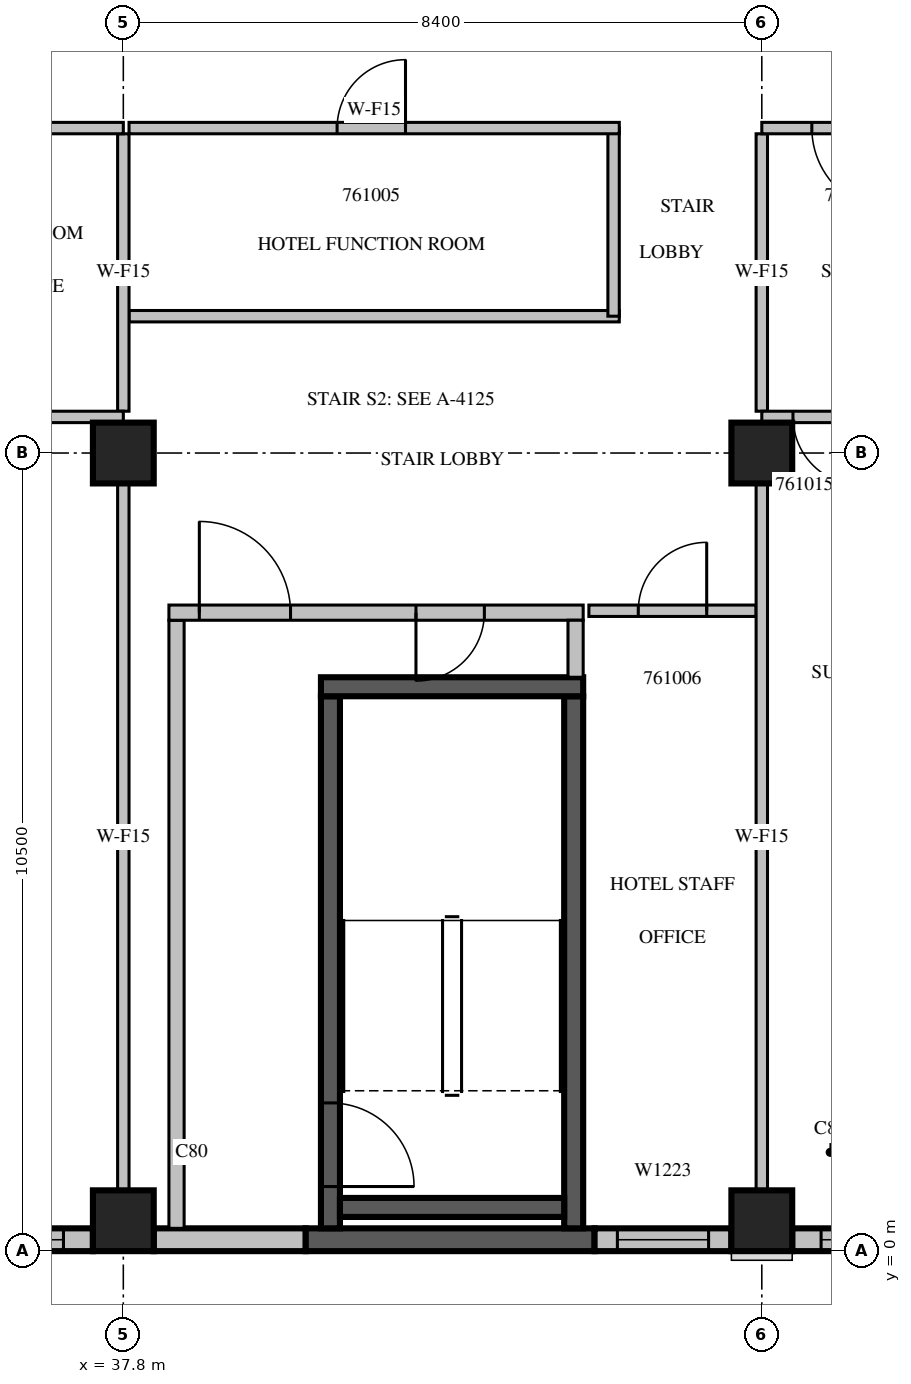
"""IFC4 building model, lengths in metres.
Left out: names, types, materials, properties, quantities, classifications, styles, units other than length and angle.
Written with IfcOpenShell. Run it as: python <this file> out.ifc"""

import sys

from ifc_helpers import new_model, si_unit, direction, frame, frame_2d, origin, origin_2d, place, context, subcontext, project, spatial, rectangle, extrude, source, transform, mapped, element, fill, save


model = new_model("IFC4")
c1 = context("Model", 3, precision=1e-05, world=origin(), true_north=direction((0.0, 1.0)))
c2 = subcontext(c1, "Body", "Model", "MODEL_VIEW")
j1 = project(units=[si_unit("LENGTHUNIT", "METRE"), si_unit("PLANEANGLEUNIT", "RADIAN")], contexts=[c1])
p1 = place(None, origin())
s1 = spatial("IfcSite", under=j1, at=p1, CompositionType="ELEMENT")
p2 = place(p1, origin())
s2 = spatial("IfcBuilding", under=s1, at=p2, CompositionType="ELEMENT")
p3 = place(p2, frame((0.0, 0.0, 265.2)))
s3 = spatial("IfcBuildingStorey", under=s2, at=p3, CompositionType="ELEMENT", Elevation=265.2)
m1 = source(origin(), c2, "Body", "SweptSolid", [
    extrude(rectangle(XDim=0.8, YDim=0.8, at=origin_2d()), origin(), (0.0, 0.0, 1.0), 3.8),
])
for number, where, z_axis, x_axis in (
    (1, (37.8, 0.4, 0.0), (0.0, 0.0, 1.0), (1.0, 0.0, 0.0)),
    (2, (46.2, 0.4, 0.0), (0.0, 0.0, 1.0), (1.0, 0.0, 0.0)),
    (3, (37.8, 10.5, 0.0), (0.0, 0.0, 1.0), (1.0, 0.0, 0.0)),
    (4, (46.2, 10.5, 0.0), (0.0, 0.0, 1.0), (1.0, 0.0, 0.0)),
):
    element("IfcColumn", number, at=place(p3, frame(where, z_axis=z_axis, x_axis=x_axis)), inside=s3, PredefinedType="COLUMN", context=c2, shape_type="MappedRepresentation", body=[
        mapped(m1, transform((0.0, 0.0, 0.0), scale=1.0)),
    ])
m2 = source(origin(), c2, "Body", "SweptSolid", [
    extrude(rectangle(XDim=7.6, YDim=0.3, at=frame_2d((3.8, 0.0))), origin(), (0.0, 0.0, 1.0), 3.4),
])
p4 = place(p3, frame((29.8, 0.15, 0.0), z_axis=(0.0, 0.0, 1.0), x_axis=(1.0, 0.0, 0.0)))
e5 = element("IfcWall", 5, at=p4, inside=s3, PredefinedType="STANDARD", context=c2, shape_type="MappedRepresentation", body=[
    mapped(m2, transform((0.0, 0.0, 0.0), scale=1.0)),
])
m3 = source(origin(), c2, "Body", "SweptSolid", [
    extrude(rectangle(XDim=1.2, YDim=2.3, at=frame_2d((0.6, 1.15))), frame((0.0, 0.16, 0.0), z_axis=(0.0, -1.0, 0.0), x_axis=(1.0, 0.0, 0.0)), (0.0, 0.0, 1.0), 0.32),
])
p5 = place(p4, frame((0.487, 0.0, 0.6)))
e6 = element("IfcOpeningElement", 6, at=p5, cuts=e5, PredefinedType="OPENING", context=c2, shape_type="MappedRepresentation", body=[
    mapped(m3, transform((0.0, 0.0, 0.0), scale=1.0)),
])
p6 = place(p4, frame((6.013, 0.0, 0.6)))
e7 = element("IfcOpeningElement", 7, at=p6, cuts=e5, PredefinedType="OPENING", context=c2, shape_type="MappedRepresentation", body=[
    mapped(m3, transform((0.0, 0.0, 0.0), scale=1.0)),
])
m4 = source(origin(), c2, "Body", "SweptSolid", [
    extrude(rectangle(XDim=2.0, YDim=0.3, at=frame_2d((1.0, 0.0))), origin(), (0.0, 0.0, 1.0), 3.4),
])
p7 = place(p3, frame((38.2, 0.15, 0.0), z_axis=(0.0, 0.0, 1.0), x_axis=(1.0, 0.0, 0.0)))
e8 = element("IfcWall", 8, at=p7, inside=s3, PredefinedType="STANDARD", context=c2, shape_type="MappedRepresentation", body=[
    mapped(m4, transform((0.0, 0.0, 0.0), scale=1.0)),
])
m5 = source(origin(), c2, "Body", "SweptSolid", [
    extrude(rectangle(XDim=3.8, YDim=0.3, at=frame_2d((1.9, 0.0))), origin(), (0.0, 0.0, 1.0), 3.4),
])
p8 = place(p3, frame((40.2, 0.15, 0.0), z_axis=(0.0, 0.0, 1.0), x_axis=(1.0, 0.0, 0.0)))
e9 = element("IfcWall", 9, at=p8, inside=s3, PredefinedType="SOLIDWALL", context=c2, shape_type="MappedRepresentation", body=[
    mapped(m5, transform((0.0, 0.0, 0.0), scale=1.0)),
])
m6 = source(origin(), c2, "Body", "SweptSolid", [
    extrude(rectangle(XDim=1.8, YDim=0.3, at=frame_2d((0.9, 0.0))), origin(), (0.0, 0.0, 1.0), 3.4),
])
p9 = place(p3, frame((44.0, 0.15, 0.0), z_axis=(0.0, 0.0, 1.0), x_axis=(1.0, 0.0, 0.0)))
e10 = element("IfcWall", 10, at=p9, inside=s3, PredefinedType="STANDARD", context=c2, shape_type="MappedRepresentation", body=[
    mapped(m6, transform((0.0, 0.0, 0.0), scale=1.0)),
])
p10 = place(p9, frame((0.3, 0.0, 0.6)))
e11 = element("IfcOpeningElement", 11, at=p10, cuts=e10, PredefinedType="OPENING", context=c2, shape_type="MappedRepresentation", body=[
    mapped(m3, transform((0.0, 0.0, 0.0), scale=1.0)),
])
m7 = source(origin(), c2, "Body", "SweptSolid", [
    extrude(rectangle(XDim=2.96, YDim=0.3, at=frame_2d((1.48, 0.0))), origin(), (0.0, 0.0, 1.0), 3.4),
])
p11 = place(p3, frame((46.6, 0.15, 0.0), z_axis=(0.0, 0.0, 1.0), x_axis=(1.0, 0.0, 0.0)))
e12 = element("IfcWall", 12, at=p11, inside=s3, PredefinedType="STANDARD", context=c2, shape_type="MappedRepresentation", body=[
    mapped(m7, transform((0.0, 0.0, 0.0), scale=1.0)),
])
m8 = source(origin(), c2, "Body", "SweptSolid", [
    extrude(rectangle(XDim=1.8, YDim=2.3, at=frame_2d((0.9, 1.15))), frame((0.0, 0.16, 0.0), z_axis=(0.0, -1.0, 0.0), x_axis=(1.0, 0.0, 0.0)), (0.0, 0.0, 1.0), 0.32),
])
p12 = place(p11, frame((0.38, 0.0, 0.6)))
e13 = element("IfcOpeningElement", 13, at=p12, cuts=e12, PredefinedType="OPENING", context=c2, shape_type="MappedRepresentation", body=[
    mapped(m8, transform((0.0, 0.0, 0.0), scale=1.0)),
])
m9 = source(origin(), c2, "Body", "SweptSolid", [
    extrude(rectangle(XDim=7.0, YDim=0.25, at=frame_2d((3.5, 0.0))), origin(), (0.0, 0.0, 1.0), 3.4),
])
p13 = place(p3, frame((40.525, 0.3, 0.0), z_axis=(0.0, 0.0, 1.0), x_axis=(0.0, 1.0, 0.0)))
e14 = element("IfcWall", 14, at=p13, inside=s3, PredefinedType="SOLIDWALL", context=c2, shape_type="MappedRepresentation", body=[
    mapped(m9, transform((0.0, 0.0, 0.0), scale=1.0)),
])
m10 = source(origin(), c2, "Body", "SweptSolid", [
    extrude(rectangle(XDim=1.1, YDim=2.1, at=frame_2d((0.55, 1.05))), frame((0.0, 0.135, 0.0), z_axis=(0.0, -1.0, 0.0), x_axis=(1.0, 0.0, 0.0)), (0.0, 0.0, 1.0), 0.27),
])
p14 = place(p13, frame((0.55, 0.0, 0.0)))
e15 = element("IfcOpeningElement", 15, at=p14, cuts=e14, PredefinedType="OPENING", context=c2, shape_type="MappedRepresentation", body=[
    mapped(m10, transform((0.0, 0.0, 0.0), scale=1.0)),
])
p15 = place(p3, frame((43.725, 0.3, 0.0), z_axis=(0.0, 0.0, 1.0), x_axis=(0.0, 1.0, 0.0)))
e16 = element("IfcWall", 16, at=p15, inside=s3, PredefinedType="SOLIDWALL", context=c2, shape_type="MappedRepresentation", body=[
    mapped(m9, transform((0.0, 0.0, 0.0), scale=1.0)),
])
m11 = source(origin(), c2, "Body", "SweptSolid", [
    extrude(rectangle(XDim=3.45, YDim=0.25, at=frame_2d((1.725, 0.0))), origin(), (0.0, 0.0, 1.0), 3.4),
])
p16 = place(p3, frame((40.4, 7.425, 0.0), z_axis=(0.0, 0.0, 1.0), x_axis=(1.0, 0.0, 0.0)))
e17 = element("IfcWall", 17, at=p16, inside=s3, PredefinedType="SOLIDWALL", context=c2, shape_type="MappedRepresentation", body=[
    mapped(m11, transform((0.0, 0.0, 0.0), scale=1.0)),
])
m12 = source(origin(), c2, "Body", "SweptSolid", [
    extrude(rectangle(XDim=2.95, YDim=0.25, at=frame_2d((1.475, 0.0))), origin(), (0.0, 0.0, 1.0), 3.4),
])
p17 = place(p3, frame((40.65, 0.575, 0.0), z_axis=(0.0, 0.0, 1.0), x_axis=(1.0, 0.0, 0.0)))
e18 = element("IfcWall", 18, at=p17, inside=s3, PredefinedType="SOLIDWALL", context=c2, shape_type="MappedRepresentation", body=[
    mapped(m12, transform((0.0, 0.0, 0.0), scale=1.0)),
])
m13 = source(origin(), c2, "Body", "SweptSolid", [
    extrude(rectangle(XDim=8.0, YDim=0.2, at=frame_2d((4.0, 0.0))), origin(), (0.0, 0.0, 1.0), 3.4),
])
p18 = place(p3, frame((38.5, 0.3, 0.0), z_axis=(0.0, 0.0, 1.0), x_axis=(0.0, 1.0, 0.0)))
e19 = element("IfcWall", 19, at=p18, inside=s3, PredefinedType="PARTITIONING", context=c2, shape_type="MappedRepresentation", body=[
    mapped(m13, transform((0.0, 0.0, 0.0), scale=1.0)),
])
m14 = source(origin(), c2, "Body", "SweptSolid", [
    extrude(rectangle(XDim=5.45, YDim=0.2, at=frame_2d((2.725, 0.0))), origin(), (0.0, 0.0, 1.0), 3.4),
])
p19 = place(p3, frame((38.4, 8.4, 0.0), z_axis=(0.0, 0.0, 1.0), x_axis=(1.0, 0.0, 0.0)))
e20 = element("IfcWall", 20, at=p19, inside=s3, PredefinedType="PARTITIONING", context=c2, shape_type="MappedRepresentation", body=[
    mapped(m14, transform((0.0, 0.0, 0.0), scale=1.0)),
])
m15 = source(origin(), c2, "Body", "SweptSolid", [
    extrude(rectangle(XDim=1.2, YDim=2.1, at=frame_2d((0.6, 1.05))), frame((0.0, 0.11, 0.0), z_axis=(0.0, -1.0, 0.0), x_axis=(1.0, 0.0, 0.0)), (0.0, 0.0, 1.0), 0.22),
])
p20 = place(p19, frame((0.4, 0.0, 0.0)))
e21 = element("IfcOpeningElement", 21, at=p20, cuts=e20, PredefinedType="OPENING", context=c2, shape_type="MappedRepresentation", body=[
    mapped(m15, transform((0.0, 0.0, 0.0), scale=1.0)),
])
m16 = source(origin(), c2, "Body", "SweptSolid", [
    extrude(rectangle(XDim=0.9, YDim=2.1, at=frame_2d((0.45, 1.05))), frame((0.0, 0.11, 0.0), z_axis=(0.0, -1.0, 0.0), x_axis=(1.0, 0.0, 0.0)), (0.0, 0.0, 1.0), 0.22),
])
p21 = place(p19, frame((3.25, 0.0, 0.0)))
e22 = element("IfcOpeningElement", 22, at=p21, cuts=e20, PredefinedType="OPENING", context=c2, shape_type="MappedRepresentation", body=[
    mapped(m16, transform((0.0, 0.0, 0.0), scale=1.0)),
])
m17 = source(origin(), c2, "Body", "SweptSolid", [
    extrude(rectangle(XDim=0.75, YDim=0.2, at=frame_2d((0.375, 0.0))), origin(), (0.0, 0.0, 1.0), 3.4),
])
p22 = place(p3, frame((43.75, 7.55, 0.0), z_axis=(0.0, 0.0, 1.0), x_axis=(0.0, 1.0, 0.0)))
e23 = element("IfcWall", 23, at=p22, inside=s3, PredefinedType="PARTITIONING", context=c2, shape_type="MappedRepresentation", body=[
    mapped(m17, transform((0.0, 0.0, 0.0), scale=1.0)),
])
m18 = source(origin(), c2, "Body", "SweptSolid", [
    extrude(rectangle(XDim=6.45, YDim=0.15, at=frame_2d((3.225, 0.0))), origin(), (0.0, 0.0, 1.0), 3.4),
])
p23 = place(p3, frame((37.875, 12.3, 0.0), z_axis=(0.0, 0.0, 1.0), x_axis=(1.0, 0.0, 0.0)))
e24 = element("IfcWall", 24, at=p23, inside=s3, PredefinedType="PARTITIONING", context=c2, shape_type="MappedRepresentation", body=[
    mapped(m18, transform((0.0, 0.0, 0.0), scale=1.0)),
])
m19 = source(origin(), c2, "Body", "SweptSolid", [
    extrude(rectangle(XDim=2.475, YDim=0.15, at=frame_2d((1.238, 0.0))), origin(), (0.0, 0.0, 1.0), 3.4),
])
p24 = place(p3, frame((44.25, 12.3, 0.0), z_axis=(0.0, 0.0, 1.0), x_axis=(0.0, 1.0, 0.0)))
e25 = element("IfcWall", 25, at=p24, inside=s3, PredefinedType="PARTITIONING", context=c2, shape_type="MappedRepresentation", body=[
    mapped(m19, transform((0.0, 0.0, 0.0), scale=1.0)),
])
p25 = place(p3, frame((44.325, 14.775, 0.0), z_axis=(0.0, 0.0, 1.0), x_axis=(-1.0, 0.0, 0.0)))
e26 = element("IfcWall", 26, at=p25, inside=s3, PredefinedType="PARTITIONING", context=c2, shape_type="MappedRepresentation", body=[
    mapped(m18, transform((0.0, 0.0, 0.0), scale=1.0)),
])
m20 = source(origin(), c2, "Body", "SweptSolid", [
    extrude(rectangle(XDim=0.9, YDim=2.1, at=frame_2d((0.45, 1.05))), frame((0.0, 0.085, 0.0), z_axis=(0.0, -1.0, 0.0), x_axis=(1.0, 0.0, 0.0)), (0.0, 0.0, 1.0), 0.17),
])
p26 = place(p25, frame((2.812, 0.0, 0.0)))
e27 = element("IfcOpeningElement", 27, at=p26, cuts=e26, PredefinedType="OPENING", context=c2, shape_type="MappedRepresentation", body=[
    mapped(m20, transform((0.0, 0.0, 0.0), scale=1.0)),
])
m21 = source(origin(), c2, "Body", "SweptSolid", [
    extrude(rectangle(XDim=2.2, YDim=0.15, at=frame_2d((1.1, 0.0))), origin(), (0.0, 0.0, 1.0), 3.4),
])
p27 = place(p3, frame((46.125, 8.425, 0.0), z_axis=(0.0, 0.0, 1.0), x_axis=(-1.0, 0.0, 0.0)))
e28 = element("IfcWall", 28, at=p27, inside=s3, PredefinedType="PARTITIONING", context=c2, shape_type="MappedRepresentation", body=[
    mapped(m21, transform((0.0, 0.0, 0.0), scale=1.0)),
])
p28 = place(p27, frame((0.65, 0.0, 0.0)))
e29 = element("IfcOpeningElement", 29, at=p28, cuts=e28, PredefinedType="OPENING", context=c2, shape_type="MappedRepresentation", body=[
    mapped(m20, transform((0.0, 0.0, 0.0), scale=1.0)),
])
m22 = source(origin(), c2, "Body", "SweptSolid", [
    extrude(rectangle(XDim=9.302, YDim=0.15, at=frame_2d((4.651, 0.0))), origin(), (0.0, 0.0, 1.0), 3.4),
])
p29 = place(p3, frame((37.8, 0.799, 0.0), z_axis=(0.0, 0.0, 1.0), x_axis=(0.0, 1.0, 0.0)))
e30 = element("IfcWall", 30, at=p29, inside=s3, PredefinedType="PARTITIONING", context=c2, shape_type="MappedRepresentation", body=[
    mapped(m22, transform((0.0, 0.0, 0.0), scale=1.0)),
])
m23 = source(origin(), c2, "Body", "SweptSolid", [
    extrude(rectangle(XDim=3.65, YDim=0.15, at=frame_2d((1.825, 0.0))), origin(), (0.0, 0.0, 1.0), 3.4),
])
p30 = place(p3, frame((37.8, 11.05, 0.0), z_axis=(0.0, 0.0, 1.0), x_axis=(0.0, 1.0, 0.0)))
e31 = element("IfcWall", 31, at=p30, inside=s3, PredefinedType="PARTITIONING", context=c2, shape_type="MappedRepresentation", body=[
    mapped(m23, transform((0.0, 0.0, 0.0), scale=1.0)),
])
m24 = source(origin(), c2, "Body", "SweptSolid", [
    extrude(rectangle(XDim=8.4, YDim=0.15, at=frame_2d((4.2, 0.0))), origin(), (0.0, 0.0, 1.0), 3.4),
])
p31 = place(p3, frame((37.8, 10.975, 0.0), z_axis=(0.0, 0.0, 1.0), x_axis=(-1.0, 0.0, 0.0)))
e32 = element("IfcWall", 32, at=p31, inside=s3, PredefinedType="PARTITIONING", context=c2, shape_type="MappedRepresentation", body=[
    mapped(m24, transform((0.0, 0.0, 0.0), scale=1.0)),
])
p32 = place(p31, frame((7.0, 0.0, 0.0)))
e33 = element("IfcOpeningElement", 33, at=p32, cuts=e32, PredefinedType="OPENING", context=c2, shape_type="MappedRepresentation", body=[
    mapped(m20, transform((0.0, 0.0, 0.0), scale=1.0)),
])
p33 = place(p31, frame((5.013, 0.0, 0.0)))
e34 = element("IfcOpeningElement", 34, at=p33, cuts=e32, PredefinedType="OPENING", context=c2, shape_type="MappedRepresentation", body=[
    mapped(m20, transform((0.0, 0.0, 0.0), scale=1.0)),
])
m25 = source(origin(), c2, "Body", "SweptSolid", [
    extrude(rectangle(XDim=1.0, YDim=2.1, at=frame_2d((0.5, 1.05))), frame((0.0, 0.085, 0.0), z_axis=(0.0, -1.0, 0.0), x_axis=(1.0, 0.0, 0.0)), (0.0, 0.0, 1.0), 0.17),
])
p34 = place(p31, frame((2.9, 0.0, 0.0)))
e35 = element("IfcOpeningElement", 35, at=p34, cuts=e32, PredefinedType="OPENING", context=c2, shape_type="MappedRepresentation", body=[
    mapped(m25, transform((0.0, 0.0, 0.0), scale=1.0)),
])
p35 = place(p31, frame((1.062, 0.0, 0.0)))
e36 = element("IfcOpeningElement", 36, at=p35, cuts=e32, PredefinedType="OPENING", context=c2, shape_type="MappedRepresentation", body=[
    mapped(m20, transform((0.0, 0.0, 0.0), scale=1.0)),
])
p36 = place(p3, frame((46.2, 0.799, 0.0), z_axis=(0.0, 0.0, 1.0), x_axis=(0.0, 1.0, 0.0)))
e37 = element("IfcWall", 37, at=p36, inside=s3, PredefinedType="PARTITIONING", context=c2, shape_type="MappedRepresentation", body=[
    mapped(m22, transform((0.0, 0.0, 0.0), scale=1.0)),
])
p37 = place(p3, frame((46.2, 11.05, 0.0), z_axis=(0.0, 0.0, 1.0), x_axis=(0.0, 1.0, 0.0)))
e38 = element("IfcWall", 38, at=p37, inside=s3, PredefinedType="PARTITIONING", context=c2, shape_type="MappedRepresentation", body=[
    mapped(m23, transform((0.0, 0.0, 0.0), scale=1.0)),
])
m26 = source(origin(), c2, "Body", "SweptSolid", [
    extrude(rectangle(XDim=7.26, YDim=0.15, at=frame_2d((3.63, 0.0))), origin(), (0.0, 0.0, 1.0), 3.4),
])
p38 = place(p3, frame((53.46, 10.975, 0.0), z_axis=(0.0, 0.0, 1.0), x_axis=(-1.0, 0.0, 0.0)))
e39 = element("IfcWall", 39, at=p38, inside=s3, PredefinedType="PARTITIONING", context=c2, shape_type="MappedRepresentation", body=[
    mapped(m26, transform((0.0, 0.0, 0.0), scale=1.0)),
])
p39 = place(p38, frame((4.999, 0.0, 0.0)))
e40 = element("IfcOpeningElement", 40, at=p39, cuts=e39, PredefinedType="OPENING", context=c2, shape_type="MappedRepresentation", body=[
    mapped(m20, transform((0.0, 0.0, 0.0), scale=1.0)),
])
p40 = place(p38, frame((5.95, 0.0, 0.0)))
e41 = element("IfcOpeningElement", 41, at=p40, cuts=e39, PredefinedType="OPENING", context=c2, shape_type="MappedRepresentation", body=[
    mapped(m20, transform((0.0, 0.0, 0.0), scale=1.0)),
])
p41 = place(p38, frame((2.264, 0.0, 0.0)))
e42 = element("IfcOpeningElement", 42, at=p41, cuts=e39, PredefinedType="OPENING", context=c2, shape_type="MappedRepresentation", body=[
    mapped(m20, transform((0.0, 0.0, 0.0), scale=1.0)),
])
p42 = place(p3, frame((37.8, 14.775, 0.0), z_axis=(0.0, 0.0, 1.0), x_axis=(-1.0, 0.0, 0.0)))
e43 = element("IfcWall", 43, at=p42, inside=s3, PredefinedType="PARTITIONING", context=c2, shape_type="MappedRepresentation", body=[
    mapped(m24, transform((0.0, 0.0, 0.0), scale=1.0)),
])
p43 = place(p42, frame((7.112, 0.0, 0.0)))
e44 = element("IfcOpeningElement", 44, at=p43, cuts=e43, PredefinedType="OPENING", context=c2, shape_type="MappedRepresentation", body=[
    mapped(m25, transform((0.0, 0.0, 0.0), scale=1.0)),
])
p44 = place(p42, frame((2.95, 0.0, 0.0)))
e45 = element("IfcOpeningElement", 45, at=p44, cuts=e43, PredefinedType="OPENING", context=c2, shape_type="MappedRepresentation", body=[
    mapped(m25, transform((0.0, 0.0, 0.0), scale=1.0)),
])
p45 = place(p3, frame((53.46, 14.775, 0.0), z_axis=(0.0, 0.0, 1.0), x_axis=(-1.0, 0.0, 0.0)))
e46 = element("IfcWall", 46, at=p45, inside=s3, PredefinedType="PARTITIONING", context=c2, shape_type="MappedRepresentation", body=[
    mapped(m26, transform((0.0, 0.0, 0.0), scale=1.0)),
])
m27 = source(origin(), c2, "Body", "SweptSolid", [
    extrude(rectangle(XDim=1.1, YDim=2.1, at=frame_2d((0.55, 1.05))), frame((0.0, 0.085, 0.0), z_axis=(0.0, -1.0, 0.0), x_axis=(1.0, 0.0, 0.0)), (0.0, 0.0, 1.0), 0.17),
])
p46 = place(p45, frame((5.502, 0.0, 0.0)))
e47 = element("IfcOpeningElement", 47, at=p46, cuts=e46, PredefinedType="OPENING", context=c2, shape_type="MappedRepresentation", body=[
    mapped(m27, transform((0.0, 0.0, 0.0), scale=1.0)),
])
m28 = source(origin(), c2, "Body", "SweptSolid", [
    extrude(rectangle(XDim=1.2, YDim=2.3, at=frame_2d((0.6, 1.15))), frame((0.0, 0.03, 0.0), z_axis=(0.0, -1.0, 0.0), x_axis=(1.0, 0.0, 0.0)), (0.0, 0.0, 1.0), 0.06),
])
p47 = place(p6, origin())
e48 = element("IfcWindow", 48, at=p47, inside=s3, PartitioningType="SINGLE_PANEL", PredefinedType="WINDOW", context=c2, shape_type="MappedRepresentation", body=[
    mapped(m28, transform((0.0, 0.0, 0.0), scale=1.0)),
])
fill(e7, e48)
p48 = place(p10, origin())
e49 = element("IfcWindow", 49, at=p48, inside=s3, PartitioningType="SINGLE_PANEL", PredefinedType="WINDOW", context=c2, shape_type="MappedRepresentation", body=[
    mapped(m28, transform((0.0, 0.0, 0.0), scale=1.0)),
])
fill(e11, e49)
m29 = source(origin(), c2, "Body", "SweptSolid", [
    extrude(rectangle(XDim=1.8, YDim=2.3, at=frame_2d((0.9, 1.15))), frame((0.0, 0.03, 0.0), z_axis=(0.0, -1.0, 0.0), x_axis=(1.0, 0.0, 0.0)), (0.0, 0.0, 1.0), 0.06),
])
p49 = place(p12, origin())
e50 = element("IfcWindow", 50, at=p49, inside=s3, PartitioningType="SINGLE_PANEL", PredefinedType="WINDOW", context=c2, shape_type="MappedRepresentation", body=[
    mapped(m29, transform((0.0, 0.0, 0.0), scale=1.0)),
])
fill(e13, e50)
m30 = source(origin(), c2, "Body", "SweptSolid", [
    extrude(rectangle(XDim=1.1, YDim=2.1, at=frame_2d((0.55, 1.05))), frame((0.0, 0.025, 0.0), z_axis=(0.0, -1.0, 0.0), x_axis=(1.0, 0.0, 0.0)), (0.0, 0.0, 1.0), 0.05),
])
p50 = place(p14, origin())
e51 = element("IfcDoor", 51, at=p50, inside=s3, OperationType="SINGLE_SWING_RIGHT", PredefinedType="DOOR", context=c2, shape_type="MappedRepresentation", body=[
    mapped(m30, transform((0.0, 0.0, 0.0), scale=1.0)),
])
fill(e15, e51)
m31 = source(origin(), c2, "Body", "SweptSolid", [
    extrude(rectangle(XDim=1.2, YDim=2.1, at=frame_2d((0.6, 1.05))), frame((0.0, 0.025, 0.0), z_axis=(0.0, -1.0, 0.0), x_axis=(1.0, 0.0, 0.0)), (0.0, 0.0, 1.0), 0.05),
])
p51 = place(p20, origin())
e52 = element("IfcDoor", 52, at=p51, inside=s3, OperationType="SINGLE_SWING_LEFT", PredefinedType="DOOR", context=c2, shape_type="MappedRepresentation", body=[
    mapped(m31, transform((0.0, 0.0, 0.0), scale=1.0)),
])
fill(e21, e52)
m32 = source(origin(), c2, "Body", "SweptSolid", [
    extrude(rectangle(XDim=0.9, YDim=2.1, at=frame_2d((0.45, 1.05))), frame((0.0, 0.025, 0.0), z_axis=(0.0, -1.0, 0.0), x_axis=(1.0, 0.0, 0.0)), (0.0, 0.0, 1.0), 0.05),
])
p52 = place(p21, origin())
e53 = element("IfcDoor", 53, at=p52, inside=s3, OperationType="SINGLE_SWING_RIGHT", PredefinedType="DOOR", context=c2, shape_type="MappedRepresentation", body=[
    mapped(m32, transform((0.0, 0.0, 0.0), scale=1.0)),
])
fill(e22, e53)
p53 = place(p26, origin())
e54 = element("IfcDoor", 54, at=p53, inside=s3, OperationType="SINGLE_SWING_RIGHT", PredefinedType="DOOR", context=c2, shape_type="MappedRepresentation", body=[
    mapped(m32, transform((0.0, 0.0, 0.0), scale=1.0)),
])
fill(e27, e54)
p54 = place(p28, origin())
e55 = element("IfcDoor", 55, at=p54, inside=s3, OperationType="SINGLE_SWING_RIGHT", PredefinedType="DOOR", context=c2, shape_type="MappedRepresentation", body=[
    mapped(m32, transform((0.0, 0.0, 0.0), scale=1.0)),
])
fill(e29, e55)
p55 = place(p46, origin())
e56 = element("IfcDoor", 56, at=p55, inside=s3, OperationType="SINGLE_SWING_LEFT", PredefinedType="DOOR", context=c2, shape_type="MappedRepresentation", body=[
    mapped(m30, transform((0.0, 0.0, 0.0), scale=1.0)),
])
fill(e47, e56)
p56 = place(p40, origin())
e57 = element("IfcDoor", 57, at=p56, inside=s3, OperationType="SINGLE_SWING_LEFT", PredefinedType="DOOR", context=c2, shape_type="MappedRepresentation", body=[
    mapped(m32, transform((0.0, 0.0, 0.0), scale=1.0)),
])
fill(e41, e57)
save(model, sys.argv[1])
